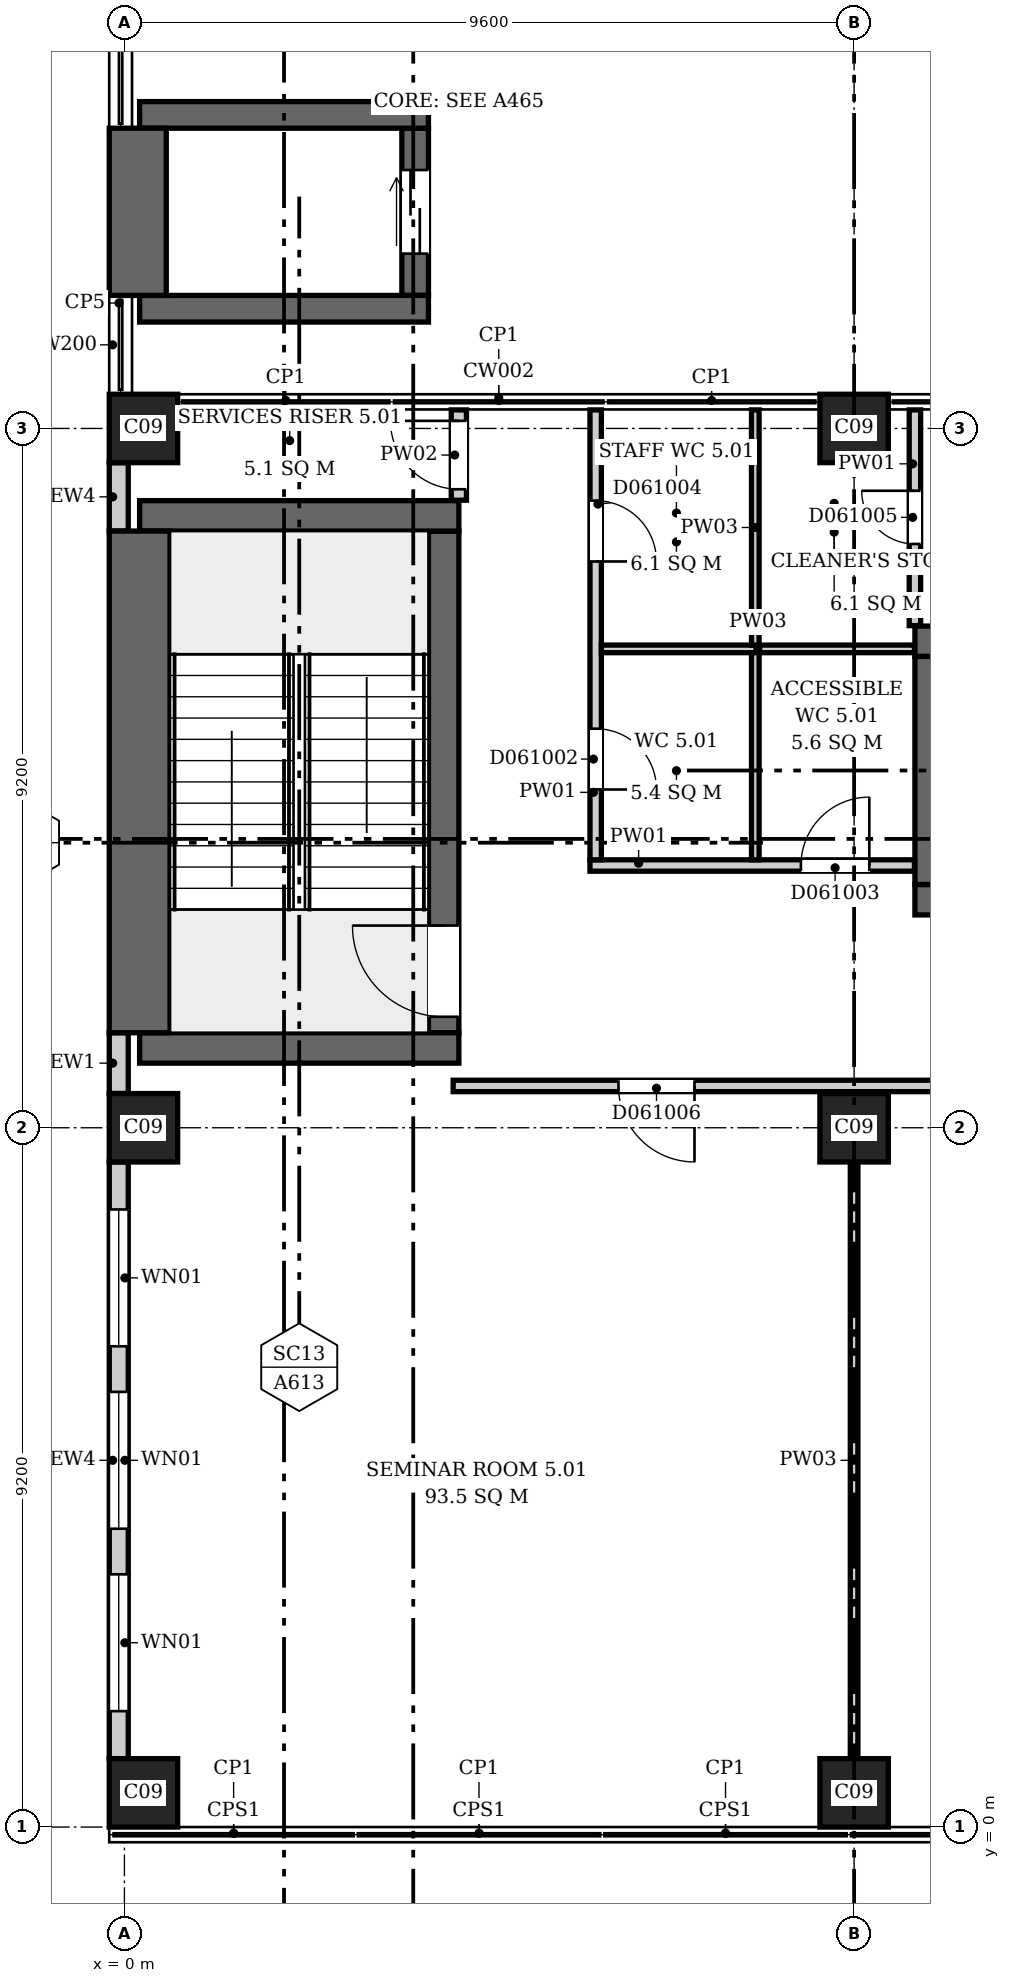
"""IFC4 building model, lengths in metres.
Left out: names, types, materials, properties, quantities, classifications, styles, units other than length and angle.
Written with IfcOpenShell. Run it as: python <this file> out.ifc"""

import sys

from ifc_helpers import new_model, si_unit, direction, frame, frame_2d, origin, origin_2d, place, context, subcontext, project, spatial, rectangle, extrude, element, fill, save


model = new_model("IFC4")
c1 = context("Model", 3, precision=1e-05, world=origin(), true_north=direction((0.0, 1.0)))
c2 = subcontext(c1, "Body", "Model", "MODEL_VIEW")
j1 = project(units=[si_unit("LENGTHUNIT", "METRE"), si_unit("PLANEANGLEUNIT", "RADIAN")], contexts=[c1])
p1 = place(None, origin())
s1 = spatial("IfcSite", under=j1, at=p1, CompositionType="ELEMENT")
p2 = place(p1, origin())
s2 = spatial("IfcBuilding", under=s1, at=p2, CompositionType="ELEMENT")
p3 = place(p2, frame((0.0, 0.0, 31.9)))
s3 = spatial("IfcBuildingStorey", under=s2, at=p3, CompositionType="ELEMENT", Elevation=31.9)
for number, where, z_axis, x_axis in (
    (1, (0.2, 10.25, 0.0), (0.0, 0.0, 1.0), (1.0, 0.0, 0.0)),
    (2, (0.2, 17.25, 0.0), (0.0, 0.0, 1.0), (1.0, 0.0, 0.0)),
):
    element("IfcWall", number, at=place(p3, frame(where, z_axis=z_axis, x_axis=x_axis)), inside=s3, PredefinedType="SHEAR", context=c2, shape_type="SweptSolid", body=[
        extrude(rectangle(XDim=4.2, YDim=0.4, at=frame_2d((2.1, 0.0))), origin(), (0.0, 0.0, 1.0), 4.2),
    ])
p4 = place(p3, frame((0.2, 10.45, 0.0), z_axis=(0.0, 0.0, 1.0), x_axis=(0.0, 1.0, 0.0)))
e3 = element("IfcWall", 3, at=p4, inside=s3, PredefinedType="SHEAR", context=c2, shape_type="SweptSolid", body=[
    extrude(rectangle(XDim=6.6, YDim=0.8, at=frame_2d((3.3, 0.0))), origin(), (0.0, 0.0, 1.0), 4.2),
])
p5 = place(p3, frame((4.2, 10.45, 0.0), z_axis=(0.0, 0.0, 1.0), x_axis=(0.0, 1.0, 0.0)))
e4 = element("IfcWall", 4, at=p5, inside=s3, PredefinedType="SHEAR", context=c2, shape_type="SweptSolid", body=[
    extrude(rectangle(XDim=6.6, YDim=0.4, at=frame_2d((3.3, 0.0))), origin(), (0.0, 0.0, 1.0), 4.2),
])
p6 = place(p5, frame((0.21, 0.0, 0.0)))
e5 = element("IfcOpeningElement", 5, at=p6, cuts=e4, PredefinedType="OPENING", context=c2, shape_type="SweptSolid", body=[
    extrude(rectangle(XDim=1.2, YDim=2.1, at=frame_2d((0.6, 1.05))), frame((0.0, 0.21, 0.0), z_axis=(0.0, -1.0, 0.0), x_axis=(1.0, 0.0, 0.0)), (0.0, 0.0, 1.0), 0.42),
])
for number, where, z_axis, x_axis in (
    (6, (0.2, 19.975, 0.0), (0.0, 0.0, 1.0), (1.0, 0.0, 0.0)),
    (7, (0.2, 22.525, 0.0), (0.0, 0.0, 1.0), (1.0, 0.0, 0.0)),
):
    element("IfcWall", number, at=place(p3, frame(where, z_axis=z_axis, x_axis=x_axis)), inside=s3, PredefinedType="SHEAR", context=c2, shape_type="SweptSolid", body=[
        extrude(rectangle(XDim=3.8, YDim=0.35, at=frame_2d((1.9, 0.0))), origin(), (0.0, 0.0, 1.0), 4.2),
    ])
p7 = place(p3, frame((0.176, 20.15, 0.0), z_axis=(0.0, 0.0, 1.0), x_axis=(0.0, 1.0, 0.0)))
e8 = element("IfcWall", 8, at=p7, inside=s3, PredefinedType="SHEAR", context=c2, shape_type="SweptSolid", body=[
    extrude(rectangle(XDim=2.2, YDim=0.75, at=frame_2d((1.1, 0.0))), origin(), (0.0, 0.0, 1.0), 4.2),
])
p8 = place(p3, frame((3.825, 20.15, 0.0), z_axis=(0.0, 0.0, 1.0), x_axis=(0.0, 1.0, 0.0)))
e9 = element("IfcWall", 9, at=p8, inside=s3, PredefinedType="SHEAR", context=c2, shape_type="SweptSolid", body=[
    extrude(rectangle(XDim=2.2, YDim=0.35, at=frame_2d((1.1, 0.0))), origin(), (0.0, 0.0, 1.0), 4.2),
])
p9 = place(p8, frame((0.55, 0.0, 0.0)))
e10 = element("IfcOpeningElement", 10, at=p9, cuts=e9, PredefinedType="OPENING", context=c2, shape_type="SweptSolid", body=[
    extrude(rectangle(XDim=1.1, YDim=2.1, at=frame_2d((0.55, 1.05))), frame((0.0, 0.185, 0.0), z_axis=(0.0, -1.0, 0.0), x_axis=(1.0, 0.0, 0.0)), (0.0, 0.0, 1.0), 0.37),
])
p10 = place(p3, frame((10.4, 12.2, 0.0), z_axis=(0.0, 0.0, 1.0), x_axis=(1.0, 0.0, 0.0)))
e11 = element("IfcWall", 11, at=p10, inside=s3, PredefinedType="SHEAR", context=c2, shape_type="SweptSolid", body=[
    extrude(rectangle(XDim=2.9, YDim=0.4, at=frame_2d((1.45, 0.0))), origin(), (0.0, 0.0, 1.0), 4.2),
])
p11 = place(p3, frame((10.4, 15.6, 0.0), z_axis=(0.0, 0.0, 1.0), x_axis=(1.0, 0.0, 0.0)))
e12 = element("IfcWall", 12, at=p11, inside=s3, PredefinedType="SHEAR", context=c2, shape_type="SweptSolid", body=[
    extrude(rectangle(XDim=2.9, YDim=0.4, at=frame_2d((1.45, 0.0))), origin(), (0.0, 0.0, 1.0), 4.2),
])
p12 = place(p11, frame((0.9, 0.0, 0.0)))
e13 = element("IfcOpeningElement", 13, at=p12, cuts=e12, PredefinedType="OPENING", context=c2, shape_type="SweptSolid", body=[
    extrude(rectangle(XDim=1.1, YDim=2.1, at=frame_2d((0.55, 1.05))), frame((0.0, 0.21, 0.0), z_axis=(0.0, -1.0, 0.0), x_axis=(1.0, 0.0, 0.0)), (0.0, 0.0, 1.0), 0.42),
])
p13 = place(p3, frame((10.6, 12.4, 0.0), z_axis=(0.0, 0.0, 1.0), x_axis=(0.0, 1.0, 0.0)))
e14 = element("IfcWall", 14, at=p13, inside=s3, PredefinedType="SHEAR", context=c2, shape_type="SweptSolid", body=[
    extrude(rectangle(XDim=3.0, YDim=0.4, at=frame_2d((1.5, 0.0))), origin(), (0.0, 0.0, 1.0), 4.2),
])
for number, where, z_axis, x_axis in (
    (15, (0.25, 0.45, 0.0), (0.0, 0.0, 1.0), (1.0, 0.0, 0.0)),
    (16, (9.6, 0.45, 0.0), (0.0, 0.0, 1.0), (1.0, 0.0, 0.0)),
    (17, (0.25, 9.2, 0.0), (0.0, 0.0, 1.0), (1.0, 0.0, 0.0)),
    (18, (9.6, 9.2, 0.0), (0.0, 0.0, 1.0), (1.0, 0.0, 0.0)),
    (19, (0.25, 18.4, 0.0), (0.0, 0.0, 1.0), (1.0, 0.0, 0.0)),
    (20, (9.6, 18.4, 0.0), (0.0, 0.0, 1.0), (1.0, 0.0, 0.0)),
):
    element("IfcColumn", number, at=place(p3, frame(where, z_axis=z_axis, x_axis=x_axis)), inside=s3, PredefinedType="COLUMN", context=c2, shape_type="SweptSolid", body=[
        extrude(rectangle(XDim=0.9, YDim=0.9, at=origin_2d()), origin(), (0.0, 0.0, 1.0), 4.2),
    ])
p14 = place(p3, frame((-0.074, 8.75, 0.0), z_axis=(0.0, 0.0, 1.0), x_axis=(0.0, -1.0, 0.0)))
e21 = element("IfcWall", 21, at=p14, inside=s3, PredefinedType="ELEMENTEDWALL", context=c2, shape_type="SweptSolid", body=[
    extrude(rectangle(XDim=7.85, YDim=0.25, at=frame_2d((3.925, 0.0))), origin(), (0.0, 0.0, 1.0), 3.9),
])
p15 = place(p14, frame((5.425, 0.0, 0.9)))
e22 = element("IfcOpeningElement", 22, at=p15, cuts=e21, PredefinedType="OPENING", context=c2, shape_type="SweptSolid", body=[
    extrude(rectangle(XDim=1.8, YDim=2.6, at=frame_2d((0.9, 1.3))), frame((0.0, 0.135, 0.0), z_axis=(0.0, -1.0, 0.0), x_axis=(1.0, 0.0, 0.0)), (0.0, 0.0, 1.0), 0.27),
])
p16 = place(p14, frame((3.025, 0.0, 0.9)))
e23 = element("IfcOpeningElement", 23, at=p16, cuts=e21, PredefinedType="OPENING", context=c2, shape_type="SweptSolid", body=[
    extrude(rectangle(XDim=1.8, YDim=2.6, at=frame_2d((0.9, 1.3))), frame((0.0, 0.135, 0.0), z_axis=(0.0, -1.0, 0.0), x_axis=(1.0, 0.0, 0.0)), (0.0, 0.0, 1.0), 0.27),
])
p17 = place(p14, frame((0.625, 0.0, 0.9)))
e24 = element("IfcOpeningElement", 24, at=p17, cuts=e21, PredefinedType="OPENING", context=c2, shape_type="SweptSolid", body=[
    extrude(rectangle(XDim=1.8, YDim=2.6, at=frame_2d((0.9, 1.3))), frame((0.0, 0.135, 0.0), z_axis=(0.0, -1.0, 0.0), x_axis=(1.0, 0.0, 0.0)), (0.0, 0.0, 1.0), 0.27),
])
p18 = place(p3, frame((-0.074, 10.45, 0.0), z_axis=(0.0, 0.0, 1.0), x_axis=(0.0, -1.0, 0.0)))
e25 = element("IfcWall", 25, at=p18, inside=s3, PredefinedType="ELEMENTEDWALL", context=c2, shape_type="SweptSolid", body=[
    extrude(rectangle(XDim=0.8, YDim=0.25, at=frame_2d((0.4, 0.0))), origin(), (0.0, 0.0, 1.0), 3.9),
])
p19 = place(p3, frame((-0.074, 17.95, 0.0), z_axis=(0.0, 0.0, 1.0), x_axis=(0.0, -1.0, 0.0)))
e26 = element("IfcWall", 26, at=p19, inside=s3, PredefinedType="ELEMENTEDWALL", context=c2, shape_type="SweptSolid", body=[
    extrude(rectangle(XDim=0.9, YDim=0.25, at=frame_2d((0.45, 0.0))), origin(), (0.0, 0.0, 1.0), 3.9),
])
p20 = place(p3, frame((4.4, 17.456, 0.0), z_axis=(0.0, 0.0, 1.0), x_axis=(0.0, 1.0, 0.0)))
e27 = element("IfcWall", 27, at=p20, inside=s3, PredefinedType="PARTITIONING", context=c2, shape_type="SweptSolid", body=[
    extrude(rectangle(XDim=1.188, YDim=0.2, at=frame_2d((0.594, 0.0))), origin(), (0.0, 0.0, 1.0), 3.9),
])
p21 = place(p20, frame((0.144, 0.0, 0.0)))
e28 = element("IfcOpeningElement", 28, at=p21, cuts=e27, PredefinedType="OPENING", context=c2, shape_type="SweptSolid", body=[
    extrude(rectangle(XDim=0.9, YDim=2.1, at=frame_2d((0.45, 1.05))), frame((0.0, 0.11, 0.0), z_axis=(0.0, -1.0, 0.0), x_axis=(1.0, 0.0, 0.0)), (0.0, 0.0, 1.0), 0.22),
])
p22 = place(p3, frame((4.325, 9.75, 0.0), z_axis=(0.0, 0.0, 1.0), x_axis=(1.0, 0.0, 0.0)))
e29 = element("IfcWall", 29, at=p22, inside=s3, PredefinedType="PARTITIONING", context=c2, shape_type="SweptSolid", body=[
    extrude(rectangle(XDim=43.869, YDim=0.15, at=frame_2d((21.935, 0.0))), origin(), (0.0, 0.0, 1.0), 3.9),
])
p23 = place(p22, frame((2.175, 0.0, 0.0)))
e30 = element("IfcOpeningElement", 30, at=p23, cuts=e29, PredefinedType="OPENING", context=c2, shape_type="SweptSolid", body=[
    extrude(rectangle(XDim=1.0, YDim=2.1, at=frame_2d((0.5, 1.05))), frame((0.0, 0.085, 0.0), z_axis=(0.0, -1.0, 0.0), x_axis=(1.0, 0.0, 0.0)), (0.0, 0.0, 1.0), 0.17),
])
p24 = place(p22, frame((9.575, 0.0, 0.0)))
e31 = element("IfcOpeningElement", 31, at=p24, cuts=e29, PredefinedType="OPENING", context=c2, shape_type="SweptSolid", body=[
    extrude(rectangle(XDim=1.0, YDim=2.1, at=frame_2d((0.5, 1.05))), frame((0.0, 0.085, 0.0), z_axis=(0.0, -1.0, 0.0), x_axis=(1.0, 0.0, 0.0)), (0.0, 0.0, 1.0), 0.17),
])
p25 = place(p22, frame((22.825, 0.0, 0.0)))
e32 = element("IfcOpeningElement", 32, at=p25, cuts=e29, PredefinedType="OPENING", context=c2, shape_type="SweptSolid", body=[
    extrude(rectangle(XDim=1.2, YDim=2.1, at=frame_2d((0.6, 1.05))), frame((0.0, 0.085, 0.0), z_axis=(0.0, -1.0, 0.0), x_axis=(1.0, 0.0, 0.0)), (0.0, 0.0, 1.0), 0.17),
])
p26 = place(p22, frame((38.525, 0.0, 0.0)))
e33 = element("IfcOpeningElement", 33, at=p26, cuts=e29, PredefinedType="OPENING", context=c2, shape_type="SweptSolid", body=[
    extrude(rectangle(XDim=0.9, YDim=2.1, at=frame_2d((0.45, 1.05))), frame((0.0, 0.085, 0.0), z_axis=(0.0, -1.0, 0.0), x_axis=(1.0, 0.0, 0.0)), (0.0, 0.0, 1.0), 0.17),
])
p27 = place(p3, frame((6.125, 12.65, 0.0), z_axis=(0.0, 0.0, 1.0), x_axis=(1.0, 0.0, 0.0)))
e34 = element("IfcWall", 34, at=p27, inside=s3, PredefinedType="PARTITIONING", context=c2, shape_type="SweptSolid", body=[
    extrude(rectangle(XDim=4.269, YDim=0.15, at=frame_2d((2.135, 0.0))), origin(), (0.0, 0.0, 1.0), 3.9),
])
p28 = place(p27, frame((2.775, 0.0, 0.0)))
e35 = element("IfcOpeningElement", 35, at=p28, cuts=e34, PredefinedType="OPENING", context=c2, shape_type="SweptSolid", body=[
    extrude(rectangle(XDim=0.9, YDim=2.1, at=frame_2d((0.45, 1.05))), frame((0.0, 0.085, 0.0), z_axis=(0.0, -1.0, 0.0), x_axis=(1.0, 0.0, 0.0)), (0.0, 0.0, 1.0), 0.17),
])
p29 = place(p3, frame((6.2, 12.725, 0.0), z_axis=(0.0, 0.0, 1.0), x_axis=(0.0, 1.0, 0.0)))
e36 = element("IfcWall", 36, at=p29, inside=s3, PredefinedType="PARTITIONING", context=c2, shape_type="SweptSolid", body=[
    extrude(rectangle(XDim=5.919, YDim=0.15, at=frame_2d((2.959, 0.0))), origin(), (0.0, 0.0, 1.0), 3.9),
])
p30 = place(p29, frame((0.925, 0.0, 0.0)))
e37 = element("IfcOpeningElement", 37, at=p30, cuts=e36, PredefinedType="OPENING", context=c2, shape_type="SweptSolid", body=[
    extrude(rectangle(XDim=0.8, YDim=2.1, at=frame_2d((0.4, 1.05))), frame((0.0, 0.085, 0.0), z_axis=(0.0, -1.0, 0.0), x_axis=(1.0, 0.0, 0.0)), (0.0, 0.0, 1.0), 0.17),
])
p31 = place(p29, frame((3.925, 0.0, 0.0)))
e38 = element("IfcOpeningElement", 38, at=p31, cuts=e36, PredefinedType="OPENING", context=c2, shape_type="SweptSolid", body=[
    extrude(rectangle(XDim=0.8, YDim=2.1, at=frame_2d((0.4, 1.05))), frame((0.0, 0.085, 0.0), z_axis=(0.0, -1.0, 0.0), x_axis=(1.0, 0.0, 0.0)), (0.0, 0.0, 1.0), 0.17),
])
p32 = place(p3, frame((6.275, 15.5, 0.0), z_axis=(0.0, 0.0, 1.0), x_axis=(1.0, 0.0, 0.0)))
e39 = element("IfcWall", 39, at=p32, inside=s3, PredefinedType="PARTITIONING", context=c2, shape_type="SweptSolid", body=[
    extrude(rectangle(XDim=4.119, YDim=0.1, at=frame_2d((2.06, 0.0))), origin(), (0.0, 0.0, 1.0), 3.9),
])
p33 = place(p3, frame((8.3, 12.725, 0.0), z_axis=(0.0, 0.0, 1.0), x_axis=(0.0, 1.0, 0.0)))
e40 = element("IfcWall", 40, at=p33, inside=s3, PredefinedType="PARTITIONING", context=c2, shape_type="SweptSolid", body=[
    extrude(rectangle(XDim=2.725, YDim=0.1, at=frame_2d((1.362, 0.0))), origin(), (0.0, 0.0, 1.0), 3.9),
])
p34 = place(p3, frame((8.3, 15.55, 0.0), z_axis=(0.0, 0.0, 1.0), x_axis=(0.0, 1.0, 0.0)))
e41 = element("IfcWall", 41, at=p34, inside=s3, PredefinedType="PARTITIONING", context=c2, shape_type="SweptSolid", body=[
    extrude(rectangle(XDim=3.094, YDim=0.1, at=frame_2d((1.547, 0.0))), origin(), (0.0, 0.0, 1.0), 3.9),
])
p35 = place(p3, frame((9.6, 0.9, 0.0), z_axis=(0.0, 0.0, 1.0), x_axis=(0.0, 1.0, 0.0)))
e42 = element("IfcWall", 42, at=p35, inside=s3, PredefinedType="PARTITIONING", context=c2, shape_type="SweptSolid", body=[
    extrude(rectangle(XDim=7.85, YDim=0.1, at=frame_2d((3.925, 0.0))), origin(), (0.0, 0.0, 1.0), 3.9),
])
p36 = place(p3, frame((10.4, 15.806, 0.0), z_axis=(0.0, 0.0, 1.0), x_axis=(0.0, 1.0, 0.0)))
e43 = element("IfcWall", 43, at=p36, inside=s3, PredefinedType="PARTITIONING", context=c2, shape_type="SweptSolid", body=[
    extrude(rectangle(XDim=2.838, YDim=0.15, at=frame_2d((1.419, 0.0))), origin(), (0.0, 0.0, 1.0), 3.9),
])
p37 = place(p36, frame((1.074, 0.0, 0.0)))
e44 = element("IfcOpeningElement", 44, at=p37, cuts=e43, PredefinedType="OPENING", context=c2, shape_type="SweptSolid", body=[
    extrude(rectangle(XDim=0.7, YDim=2.1, at=frame_2d((0.35, 1.05))), frame((0.0, 0.085, 0.0), z_axis=(0.0, -1.0, 0.0), x_axis=(1.0, 0.0, 0.0)), (0.0, 0.0, 1.0), 0.17),
])
p38 = place(p15, origin())
e45 = element("IfcWindow", 45, at=p38, inside=s3, PartitioningType="SINGLE_PANEL", PredefinedType="WINDOW", context=c2, shape_type="SweptSolid", body=[
    extrude(rectangle(XDim=1.8, YDim=2.6, at=frame_2d((0.9, 1.3))), frame((0.0, 0.03, 0.0), z_axis=(0.0, -1.0, 0.0), x_axis=(1.0, 0.0, 0.0)), (0.0, 0.0, 1.0), 0.06),
])
fill(e22, e45)
p39 = place(p16, origin())
e46 = element("IfcWindow", 46, at=p39, inside=s3, PartitioningType="SINGLE_PANEL", PredefinedType="WINDOW", context=c2, shape_type="SweptSolid", body=[
    extrude(rectangle(XDim=1.8, YDim=2.6, at=frame_2d((0.9, 1.3))), frame((0.0, 0.03, 0.0), z_axis=(0.0, -1.0, 0.0), x_axis=(1.0, 0.0, 0.0)), (0.0, 0.0, 1.0), 0.06),
])
fill(e23, e46)
p40 = place(p17, origin())
e47 = element("IfcWindow", 47, at=p40, inside=s3, PartitioningType="SINGLE_PANEL", PredefinedType="WINDOW", context=c2, shape_type="SweptSolid", body=[
    extrude(rectangle(XDim=1.8, YDim=2.6, at=frame_2d((0.9, 1.3))), frame((0.0, 0.03, 0.0), z_axis=(0.0, -1.0, 0.0), x_axis=(1.0, 0.0, 0.0)), (0.0, 0.0, 1.0), 0.06),
])
fill(e24, e47)
p41 = place(p6, origin())
e48 = element("IfcDoor", 48, at=p41, inside=s3, OperationType="SINGLE_SWING_RIGHT", PredefinedType="DOOR", context=c2, shape_type="SweptSolid", body=[
    extrude(rectangle(XDim=1.2, YDim=2.1, at=frame_2d((0.6, 1.05))), frame((0.0, 0.025, 0.0), z_axis=(0.0, -1.0, 0.0), x_axis=(1.0, 0.0, 0.0)), (0.0, 0.0, 1.0), 0.05),
])
fill(e5, e48)
p42 = place(p9, origin())
e49 = element("IfcDoor", 49, at=p42, inside=s3, OperationType="DOUBLE_DOOR_SLIDING", PredefinedType="DOOR", context=c2, shape_type="SweptSolid", body=[
    extrude(rectangle(XDim=1.1, YDim=2.1, at=frame_2d((0.55, 1.05))), frame((0.0, 0.025, 0.0), z_axis=(0.0, -1.0, 0.0), x_axis=(1.0, 0.0, 0.0)), (0.0, 0.0, 1.0), 0.05),
])
fill(e10, e49)
p43 = place(p21, origin())
e50 = element("IfcDoor", 50, at=p43, inside=s3, OperationType="SINGLE_SWING_LEFT", PredefinedType="DOOR", context=c2, shape_type="SweptSolid", body=[
    extrude(rectangle(XDim=0.9, YDim=2.1, at=frame_2d((0.45, 1.05))), frame((0.0, 0.025, 0.0), z_axis=(0.0, -1.0, 0.0), x_axis=(1.0, 0.0, 0.0)), (0.0, 0.0, 1.0), 0.05),
])
fill(e28, e50)
p44 = place(p30, origin())
e51 = element("IfcDoor", 51, at=p44, inside=s3, OperationType="SINGLE_SWING_LEFT", PredefinedType="DOOR", context=c2, shape_type="SweptSolid", body=[
    extrude(rectangle(XDim=0.8, YDim=2.1, at=frame_2d((0.4, 1.05))), frame((0.0, 0.025, 0.0), z_axis=(0.0, -1.0, 0.0), x_axis=(1.0, 0.0, 0.0)), (0.0, 0.0, 1.0), 0.05),
])
fill(e37, e51)
p45 = place(p28, origin())
e52 = element("IfcDoor", 52, at=p45, inside=s3, OperationType="SINGLE_SWING_RIGHT", PredefinedType="DOOR", context=c2, shape_type="SweptSolid", body=[
    extrude(rectangle(XDim=0.9, YDim=2.1, at=frame_2d((0.45, 1.05))), frame((0.0, 0.025, 0.0), z_axis=(0.0, -1.0, 0.0), x_axis=(1.0, 0.0, 0.0)), (0.0, 0.0, 1.0), 0.05),
])
fill(e35, e52)
p46 = place(p31, origin())
e53 = element("IfcDoor", 53, at=p46, inside=s3, OperationType="SINGLE_SWING_LEFT", PredefinedType="DOOR", context=c2, shape_type="SweptSolid", body=[
    extrude(rectangle(XDim=0.8, YDim=2.1, at=frame_2d((0.4, 1.05))), frame((0.0, 0.025, 0.0), z_axis=(0.0, -1.0, 0.0), x_axis=(1.0, 0.0, 0.0)), (0.0, 0.0, 1.0), 0.05),
])
fill(e38, e53)
p47 = place(p37, origin())
e54 = element("IfcDoor", 54, at=p47, inside=s3, OperationType="SINGLE_SWING_LEFT", PredefinedType="DOOR", context=c2, shape_type="SweptSolid", body=[
    extrude(rectangle(XDim=0.7, YDim=2.1, at=frame_2d((0.35, 1.05))), frame((0.0, 0.025, 0.0), z_axis=(0.0, -1.0, 0.0), x_axis=(1.0, 0.0, 0.0)), (0.0, 0.0, 1.0), 0.05),
])
fill(e44, e54)
p48 = place(p23, origin())
e55 = element("IfcDoor", 55, at=p48, inside=s3, OperationType="SINGLE_SWING_RIGHT", PredefinedType="DOOR", context=c2, shape_type="SweptSolid", body=[
    extrude(rectangle(XDim=1.0, YDim=2.1, at=frame_2d((0.5, 1.05))), frame((0.0, 0.025, 0.0), z_axis=(0.0, -1.0, 0.0), x_axis=(1.0, 0.0, 0.0)), (0.0, 0.0, 1.0), 0.05),
])
fill(e30, e55)
save(model, sys.argv[1])
